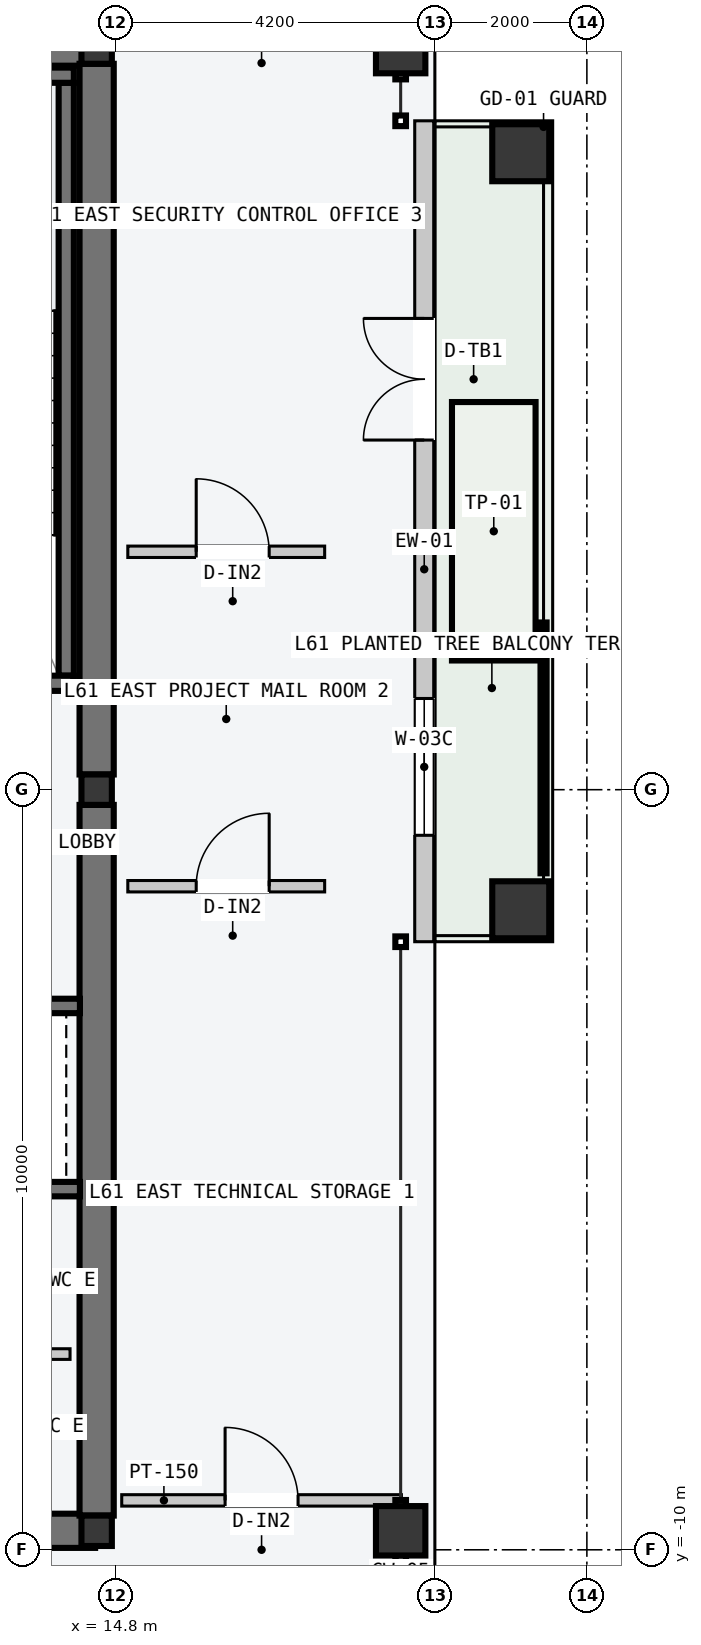
"""IFC4 building model, lengths in metres.
Left out: names, types, materials, properties, quantities, classifications, styles, units other than length and angle.
Written with IfcOpenShell. Run it as: python <this file> out.ifc"""

import sys

from ifc_helpers import new_model, si_unit, direction, frame, frame_2d, origin, origin_2d, place, context, subcontext, project, spatial, rectangle, hollow_rectangle, i_section, extrude, element, fill, save


model = new_model("IFC4")
c1 = context("Model", 3, precision=1e-05, world=origin(), true_north=direction((0.0, 1.0)))
c2 = subcontext(c1, "Body", "Model", "MODEL_VIEW")
j1 = project(units=[si_unit("LENGTHUNIT", "METRE"), si_unit("PLANEANGLEUNIT", "RADIAN")], contexts=[c1])
p1 = place(None, origin())
s1 = spatial("IfcSite", under=j1, at=p1, CompositionType="ELEMENT")
p2 = place(p1, origin())
s2 = spatial("IfcBuilding", under=s1, at=p2, CompositionType="ELEMENT")
p3 = place(p2, frame((0.0, 0.0, 232.8)))
s3 = spatial("IfcBuildingStorey", under=s2, at=p3, CompositionType="ELEMENT", Elevation=232.8)
for number, where, z_axis, x_axis in (
    (1, (8.07, -9.75, -0.2), (0.0, 0.0, 1.0), (1.0, 0.0, 0.0)),
    (2, (8.07, 9.75, -0.2), (0.0, 0.0, 1.0), (1.0, 0.0, 0.0)),
):
    element("IfcWall", number, at=place(p3, frame(where, z_axis=z_axis, x_axis=x_axis)), inside=s3, PredefinedType="SHEAR", context=c2, shape_type="SweptSolid", body=[
        extrude(rectangle(XDim=6.46, YDim=0.45, at=frame_2d((3.23, 0.0))), origin(), (0.0, 0.0, 1.0), 3.6),
    ])
for number, where, z_axis, x_axis in (
    (3, (14.55, -9.55, -0.2), (0.0, 0.0, 1.0), (0.0, 1.0, 0.0)),
    (4, (14.55, 0.2, -0.2), (0.0, 0.0, 1.0), (0.0, 1.0, 0.0)),
):
    element("IfcWall", number, at=place(p3, frame(where, z_axis=z_axis, x_axis=x_axis)), inside=s3, PredefinedType="SHEAR", context=c2, shape_type="SweptSolid", body=[
        extrude(rectangle(XDim=9.35, YDim=0.45, at=frame_2d((4.675, 0.0))), origin(), (0.0, 0.0, 1.0), 3.6),
    ])
p4 = place(p3, frame((14.15, 1.5, -0.2), z_axis=(0.0, 0.0, 1.0), x_axis=(0.0, 1.0, 0.0)))
e5 = element("IfcWall", 5, at=p4, inside=s3, PredefinedType="SOLIDWALL", context=c2, shape_type="SweptSolid", body=[
    extrude(rectangle(XDim=7.8, YDim=0.2, at=frame_2d((3.9, 0.0))), origin(), (0.0, 0.0, 1.0), 3.6),
])
p5 = place(p3, frame((10.53, 1.4, -0.2), z_axis=(0.0, 0.0, 1.0), x_axis=(1.0, 0.0, 0.0)))
e6 = element("IfcWall", 6, at=p5, inside=s3, PredefinedType="SOLIDWALL", context=c2, shape_type="SweptSolid", body=[
    extrude(rectangle(XDim=3.72, YDim=0.2, at=frame_2d((1.86, 0.0))), origin(), (0.0, 0.0, 1.0), 3.6),
])
p6 = place(p5, frame((1.5, 0.0, 0.2)))
e7 = element("IfcOpeningElement", 7, at=p6, cuts=e6, PredefinedType="OPENING", context=c2, shape_type="SweptSolid", body=[
    extrude(rectangle(XDim=1.12, YDim=2.18, at=frame_2d((0.56, 1.09))), frame((0.0, 0.11, 0.0), z_axis=(0.0, -1.0, 0.0), x_axis=(1.0, 0.0, 0.0)), (0.0, 0.0, 1.0), 0.22),
])
p7 = place(p3, frame((10.53, 9.4, -0.2), z_axis=(0.0, 0.0, 1.0), x_axis=(1.0, 0.0, 0.0)))
e8 = element("IfcWall", 8, at=p7, inside=s3, PredefinedType="SOLIDWALL", context=c2, shape_type="SweptSolid", body=[
    extrude(rectangle(XDim=3.72, YDim=0.2, at=frame_2d((1.86, 0.0))), origin(), (0.0, 0.0, 1.0), 3.6),
])
for number, where, z_axis, x_axis in (
    (9, (14.55, -9.75, 0.0), (0.0, 0.0, 1.0), (1.0, 0.0, 0.0)),
    (10, (14.55, 0.0, 0.0), (0.0, 0.0, 1.0), (1.0, 0.0, 0.0)),
    (11, (14.55, 9.75, 0.0), (0.0, 0.0, 1.0), (1.0, 0.0, 0.0)),
):
    element("IfcColumn", number, at=place(p3, frame(where, z_axis=z_axis, x_axis=x_axis)), inside=s3, PredefinedType="COLUMN", context=c2, shape_type="SweptSolid", body=[
        extrude(i_section(OverallWidth=0.4, OverallDepth=0.4, WebThickness=0.013, FlangeThickness=0.021, at=origin_2d()), origin(), (0.0, 0.0, 1.0), 3.6),
    ])
for number, where, z_axis, x_axis in (
    (12, (18.55, -9.75, 0.0), (0.0, 0.0, 1.0), (0.0, 1.0, 0.0)),
    (13, (18.55, 9.75, 0.0), (0.0, 0.0, 1.0), (0.0, 1.0, 0.0)),
):
    element("IfcColumn", number, at=place(p3, frame(where, z_axis=z_axis, x_axis=x_axis)), inside=s3, PredefinedType="COLUMN", context=c2, shape_type="SweptSolid", body=[
        extrude(hollow_rectangle(XDim=0.65, YDim=0.65, WallThickness=0.028, at=origin_2d()), origin(), (0.0, 0.0, 1.0), 3.6),
    ])
for number, where, z_axis, x_axis in (
    (14, (20.13, -1.58, 0.0), (0.0, 0.0, 1.0), (0.0, 1.0, 0.0)),
    (15, (20.13, 8.38, 0.0), (0.0, 0.0, 1.0), (0.0, 1.0, 0.0)),
):
    element("IfcColumn", number, at=place(p3, frame(where, z_axis=z_axis, x_axis=x_axis)), inside=s3, PredefinedType="COLUMN", context=c2, shape_type="SweptSolid", body=[
        extrude(hollow_rectangle(XDim=0.75, YDim=0.75, WallThickness=0.032, at=origin_2d()), origin(), (0.0, 0.0, 1.0), 3.6),
    ])
p8 = place(p3, frame((18.86, -2.0, 0.0), z_axis=(0.0, 0.0, 1.0), x_axis=(0.0, 1.0, 0.0)))
e16 = element("IfcWall", 16, at=p8, inside=s3, PredefinedType="STANDARD", context=c2, shape_type="SweptSolid", body=[
    extrude(rectangle(XDim=10.8, YDim=0.25, at=frame_2d((5.4, 0.0))), origin(), (0.0, 0.0, 1.0), 3.4),
])
p9 = place(p8, frame((6.6, 0.0, 0.0)))
e17 = element("IfcOpeningElement", 17, at=p9, cuts=e16, PredefinedType="OPENING", context=c2, shape_type="SweptSolid", body=[
    extrude(rectangle(XDim=1.6, YDim=2.2, at=frame_2d((0.8, 1.1))), frame((0.0, 0.135, 0.0), z_axis=(0.0, -1.0, 0.0), x_axis=(1.0, 0.0, 0.0)), (0.0, 0.0, 1.0), 0.27),
])
p10 = place(p8, frame((1.4, 0.0, 0.85)))
e18 = element("IfcOpeningElement", 18, at=p10, cuts=e16, PredefinedType="OPENING", context=c2, shape_type="SweptSolid", body=[
    extrude(rectangle(XDim=1.8, YDim=2.05, at=frame_2d((0.9, 1.025))), frame((0.0, 0.135, 0.0), z_axis=(0.0, -1.0, 0.0), x_axis=(1.0, 0.0, 0.0)), (0.0, 0.0, 1.0), 0.27),
])
p11 = place(p3, frame((11.65, -2.845, -0.2), z_axis=(0.0, 0.0, 1.0), x_axis=(1.0, 0.0, 0.0)))
e19 = element("IfcWall", 19, at=p11, inside=s3, PredefinedType="SOLIDWALL", context=c2, shape_type="SweptSolid", body=[
    extrude(rectangle(XDim=2.68, YDim=0.19, at=frame_2d((1.34, 0.0))), origin(), (0.0, 0.0, 1.0), 3.6),
])
p12 = place(p11, frame((0.65, 0.0, 0.2)))
e20 = element("IfcOpeningElement", 20, at=p12, cuts=e19, PredefinedType="OPENING", context=c2, shape_type="SweptSolid", body=[
    extrude(rectangle(XDim=1.2, YDim=2.2, at=frame_2d((0.6, 1.1))), frame((0.0, 0.105, 0.0), z_axis=(0.0, -1.0, 0.0), x_axis=(1.0, 0.0, 0.0)), (0.0, 0.0, 1.0), 0.21),
])
p13 = place(p3, frame((11.65, -5.255, -0.2), z_axis=(0.0, 0.0, 1.0), x_axis=(1.0, 0.0, 0.0)))
e21 = element("IfcWall", 21, at=p13, inside=s3, PredefinedType="SOLIDWALL", context=c2, shape_type="SweptSolid", body=[
    extrude(rectangle(XDim=2.68, YDim=0.19, at=frame_2d((1.34, 0.0))), origin(), (0.0, 0.0, 1.0), 3.6),
])
p14 = place(p3, frame((11.7, -7.425, 0.0), z_axis=(0.0, 0.0, 1.0), x_axis=(1.0, 0.0, 0.0)))
e22 = element("IfcWall", 22, at=p14, inside=s3, PredefinedType="PARTITIONING", context=c2, shape_type="SweptSolid", body=[
    extrude(rectangle(XDim=2.5, YDim=0.14, at=frame_2d((1.25, 0.0))), origin(), (0.0, 0.0, 1.0), 3.4),
])
p15 = place(p3, frame((14.88, -9.35, 0.0), z_axis=(0.0, 0.0, 1.0), x_axis=(1.0, 0.0, 0.0)))
e23 = element("IfcWall", 23, at=p15, inside=s3, PredefinedType="PARTITIONING", context=c2, shape_type="SweptSolid", body=[
    extrude(rectangle(XDim=3.68, YDim=0.15, at=frame_2d((1.84, 0.0))), origin(), (0.0, 0.0, 1.0), 3.4),
])
p16 = place(p15, frame((1.36, 0.0, 0.0)))
e24 = element("IfcOpeningElement", 24, at=p16, cuts=e23, PredefinedType="OPENING", context=c2, shape_type="SweptSolid", body=[
    extrude(rectangle(XDim=0.96, YDim=2.18, at=frame_2d((0.48, 1.09))), frame((0.0, 0.085, 0.0), z_axis=(0.0, -1.0, 0.0), x_axis=(1.0, 0.0, 0.0)), (0.0, 0.0, 1.0), 0.17),
])
p17 = place(p3, frame((14.96, -1.27, 0.0), z_axis=(0.0, 0.0, 1.0), x_axis=(1.0, 0.0, 0.0)))
e25 = element("IfcWall", 25, at=p17, inside=s3, PredefinedType="PARTITIONING", context=c2, shape_type="SweptSolid", body=[
    extrude(rectangle(XDim=2.59, YDim=0.15, at=frame_2d((1.295, 0.0))), origin(), (0.0, 0.0, 1.0), 3.4),
])
p18 = place(p17, frame((0.9, 0.0, 0.0)))
e26 = element("IfcOpeningElement", 26, at=p18, cuts=e25, PredefinedType="OPENING", context=c2, shape_type="SweptSolid", body=[
    extrude(rectangle(XDim=0.96, YDim=2.18, at=frame_2d((0.48, 1.09))), frame((0.0, 0.085, 0.0), z_axis=(0.0, -1.0, 0.0), x_axis=(1.0, 0.0, 0.0)), (0.0, 0.0, 1.0), 0.17),
])
p19 = place(p3, frame((14.96, 3.13, 0.0), z_axis=(0.0, 0.0, 1.0), x_axis=(1.0, 0.0, 0.0)))
e27 = element("IfcWall", 27, at=p19, inside=s3, PredefinedType="PARTITIONING", context=c2, shape_type="SweptSolid", body=[
    extrude(rectangle(XDim=2.59, YDim=0.15, at=frame_2d((1.295, 0.0))), origin(), (0.0, 0.0, 1.0), 3.4),
])
p20 = place(p19, frame((0.9, 0.0, 0.0)))
e28 = element("IfcOpeningElement", 28, at=p20, cuts=e27, PredefinedType="OPENING", context=c2, shape_type="SweptSolid", body=[
    extrude(rectangle(XDim=0.96, YDim=2.18, at=frame_2d((0.48, 1.09))), frame((0.0, 0.085, 0.0), z_axis=(0.0, -1.0, 0.0), x_axis=(1.0, 0.0, 0.0)), (0.0, 0.0, 1.0), 0.17),
])
p21 = place(p9, origin())
e29 = element("IfcDoor", 29, at=p21, inside=s3, OperationType="DOUBLE_DOOR_SINGLE_SWING", PredefinedType="DOOR", context=c2, shape_type="SweptSolid", body=[
    extrude(rectangle(XDim=1.6, YDim=2.2, at=frame_2d((0.8, 1.1))), frame((0.0, 0.025, 0.0), z_axis=(0.0, -1.0, 0.0), x_axis=(1.0, 0.0, 0.0)), (0.0, 0.0, 1.0), 0.05),
])
fill(e17, e29)
p22 = place(p10, origin())
e30 = element("IfcWindow", 30, at=p22, inside=s3, PartitioningType="SINGLE_PANEL", PredefinedType="WINDOW", context=c2, shape_type="SweptSolid", body=[
    extrude(rectangle(XDim=1.8, YDim=2.05, at=frame_2d((0.9, 1.025))), frame((0.0, 0.03, 0.0), z_axis=(0.0, -1.0, 0.0), x_axis=(1.0, 0.0, 0.0)), (0.0, 0.0, 1.0), 0.06),
])
fill(e18, e30)
p23 = place(p16, origin())
e31 = element("IfcDoor", 31, at=p23, inside=s3, OperationType="SINGLE_SWING_LEFT", PredefinedType="DOOR", context=c2, shape_type="SweptSolid", body=[
    extrude(rectangle(XDim=0.96, YDim=2.18, at=frame_2d((0.48, 1.09))), frame((0.0, 0.025, 0.0), z_axis=(0.0, -1.0, 0.0), x_axis=(1.0, 0.0, 0.0)), (0.0, 0.0, 1.0), 0.05),
])
fill(e24, e31)
p24 = place(p18, origin())
e32 = element("IfcDoor", 32, at=p24, inside=s3, OperationType="SINGLE_SWING_RIGHT", PredefinedType="DOOR", context=c2, shape_type="SweptSolid", body=[
    extrude(rectangle(XDim=0.96, YDim=2.18, at=frame_2d((0.48, 1.09))), frame((0.0, 0.025, 0.0), z_axis=(0.0, -1.0, 0.0), x_axis=(1.0, 0.0, 0.0)), (0.0, 0.0, 1.0), 0.05),
])
fill(e26, e32)
p25 = place(p20, origin())
e33 = element("IfcDoor", 33, at=p25, inside=s3, OperationType="SINGLE_SWING_LEFT", PredefinedType="DOOR", context=c2, shape_type="SweptSolid", body=[
    extrude(rectangle(XDim=0.96, YDim=2.18, at=frame_2d((0.48, 1.09))), frame((0.0, 0.025, 0.0), z_axis=(0.0, -1.0, 0.0), x_axis=(1.0, 0.0, 0.0)), (0.0, 0.0, 1.0), 0.05),
])
fill(e28, e33)
save(model, sys.argv[1])
